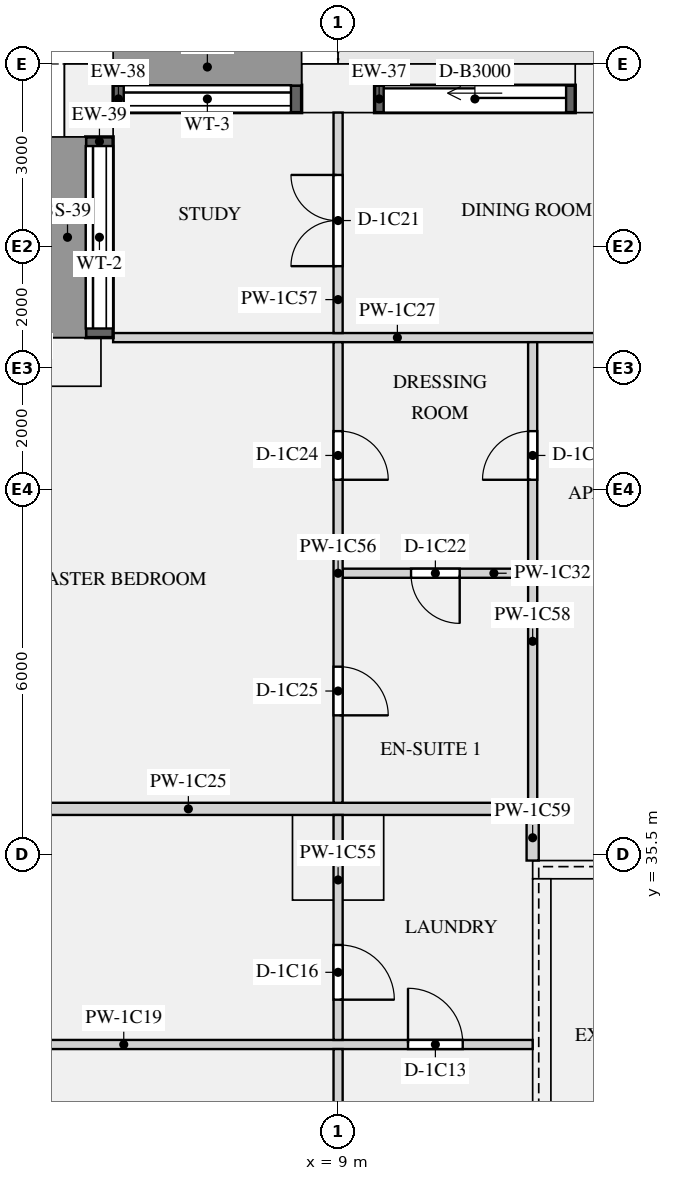
"""IFC4 building model, lengths in metres.
Left out: names, types, materials, properties, quantities, classifications, styles, units other than length and angle.
Written with IfcOpenShell. Run it as: python <this file> out.ifc"""

import sys

from ifc_helpers import new_model, si_unit, direction, frame, frame_2d, origin, origin_2d, place, context, subcontext, project, spatial, rectangle, extrude, element, fill, save


model = new_model("IFC4")
c1 = context("Model", 3, precision=1e-05, world=origin(), true_north=direction((0.0, 1.0)))
c2 = subcontext(c1, "Body", "Model", "MODEL_VIEW")
j1 = project(units=[si_unit("LENGTHUNIT", "METRE"), si_unit("PLANEANGLEUNIT", "RADIAN")], contexts=[c1])
p1 = place(None, origin())
s1 = spatial("IfcSite", under=j1, at=p1, CompositionType="ELEMENT")
p2 = place(p1, origin())
s2 = spatial("IfcBuilding", under=s1, at=p2, CompositionType="ELEMENT")
p3 = place(p2, frame((0.0, 0.0, 38.4)))
s3 = spatial("IfcBuildingStorey", under=s2, at=p3, CompositionType="ELEMENT", Elevation=38.4)
for number, where, z_axis, x_axis in (
    (1, (13.5, 48.1, 0.0), (0.0, 0.0, 1.0), (-1.0, 0.0, 0.0)),
    (2, (9.0, 48.1, 0.0), (0.0, 0.0, 1.0), (-1.0, 0.0, 0.0)),
    (3, (4.9, 47.9, 0.0), (0.0, 0.0, 1.0), (0.0, -1.0, 0.0)),
    (4, (4.5, 43.6, 0.0), (0.0, 0.0, 1.0), (-1.0, 0.0, 0.0)),
):
    element("IfcColumn", number, at=place(p3, frame(where, z_axis=z_axis, x_axis=x_axis)), inside=s3, PredefinedType="USERDEFINED", context=c2, shape_type="SweptSolid", body=[
        extrude(rectangle(XDim=1.2, YDim=0.8, at=origin_2d()), origin(), (0.0, 0.0, 1.0), 3.15),
    ])
p4 = place(p3, frame((9.0, 35.5, 0.0), z_axis=(0.0, 0.0, 1.0), x_axis=(1.0, 0.0, 0.0)))
e5 = element("IfcColumn", 5, at=p4, inside=s3, PredefinedType="COLUMN", context=c2, shape_type="SweptSolid", body=[
    extrude(rectangle(XDim=1.5, YDim=1.5, at=origin_2d()), origin(), (0.0, 0.0, 1.0), 3.15),
])
p5 = place(p3, frame((12.2, 35.25, 0.0), z_axis=(0.0, 0.0, 1.0), x_axis=(1.0, 0.0, 0.0)))
e6 = element("IfcWall", 6, at=p5, inside=s3, PredefinedType="SHEAR", context=c2, shape_type="SweptSolid", body=[
    extrude(rectangle(XDim=3.6, YDim=0.3, at=frame_2d((1.8, 0.0))), origin(), (0.0, 0.0, 1.0), 3.15),
])
p6 = place(p3, frame((12.35, 27.3, 0.0), z_axis=(0.0, 0.0, 1.0), x_axis=(0.0, 1.0, 0.0)))
e7 = element("IfcWall", 7, at=p6, inside=s3, PredefinedType="SHEAR", context=c2, shape_type="SweptSolid", body=[
    extrude(rectangle(XDim=7.8, YDim=0.3, at=frame_2d((3.9, 0.0))), origin(), (0.0, 0.0, 1.0), 3.15),
])
p7 = place(p3, frame((12.9, 47.925, 0.0), z_axis=(0.0, 0.0, 1.0), x_axis=(-1.0, 0.0, 0.0)))
e8 = element("IfcWall", 8, at=p7, inside=s3, PredefinedType="SOLIDWALL", context=c2, shape_type="SweptSolid", body=[
    extrude(rectangle(XDim=3.3, YDim=0.45, at=frame_2d((1.65, 0.0))), origin(), (0.0, 0.0, 1.0), 2.83),
])
p8 = place(p7, frame((0.15, 0.0, 0.0)))
e9 = element("IfcOpeningElement", 9, at=p8, cuts=e8, PredefinedType="OPENING", context=c2, shape_type="SweptSolid", body=[
    extrude(rectangle(XDim=3.0, YDim=2.3, at=frame_2d((1.5, 1.15))), frame((0.0, 0.235, 0.0), z_axis=(0.0, -1.0, 0.0), x_axis=(1.0, 0.0, 0.0)), (0.0, 0.0, 1.0), 0.47),
])
p9 = place(p3, frame((8.4, 47.925, 0.9), z_axis=(0.0, 0.0, 1.0), x_axis=(-1.0, 0.0, 0.0)))
e10 = element("IfcWall", 10, at=p9, inside=s3, PredefinedType="SOLIDWALL", context=c2, shape_type="SweptSolid", body=[
    extrude(rectangle(XDim=3.1, YDim=0.45, at=frame_2d((1.55, 0.0))), origin(), (0.0, 0.0, 1.0), 1.93),
])
p10 = place(p9, frame((0.175, 0.0, 0.15)))
e11 = element("IfcOpeningElement", 11, at=p10, cuts=e10, PredefinedType="OPENING", context=c2, shape_type="SweptSolid", body=[
    extrude(rectangle(XDim=2.75, YDim=1.5, at=frame_2d((1.375, 0.75))), frame((0.0, 0.235, 0.0), z_axis=(0.0, -1.0, 0.0), x_axis=(1.0, 0.0, 0.0)), (0.0, 0.0, 1.0), 0.47),
])
p11 = place(p3, frame((5.075, 47.3, 0.9), z_axis=(0.0, 0.0, 1.0), x_axis=(0.0, -1.0, 0.0)))
e12 = element("IfcWall", 12, at=p11, inside=s3, PredefinedType="SOLIDWALL", context=c2, shape_type="SweptSolid", body=[
    extrude(rectangle(XDim=3.3, YDim=0.45, at=frame_2d((1.65, 0.0))), origin(), (0.0, 0.0, 1.0), 1.93),
])
p12 = place(p11, frame((0.15, 0.0, 0.15)))
e13 = element("IfcOpeningElement", 13, at=p12, cuts=e12, PredefinedType="OPENING", context=c2, shape_type="SweptSolid", body=[
    extrude(rectangle(XDim=3.0, YDim=1.5, at=frame_2d((1.5, 0.75))), frame((0.0, 0.235, 0.0), z_axis=(0.0, -1.0, 0.0), x_axis=(1.0, 0.0, 0.0)), (0.0, 0.0, 1.0), 0.47),
])
p13 = place(p3, frame((0.8, 32.375, 0.0), z_axis=(0.0, 0.0, 1.0), x_axis=(1.0, 0.0, 0.0)))
e14 = element("IfcWall", 14, at=p13, inside=s3, PredefinedType="PARTITIONING", context=c2, shape_type="SweptSolid", body=[
    extrude(rectangle(XDim=11.4, YDim=0.15, at=frame_2d((5.7, 0.0))), origin(), (0.0, 0.0, 1.0), 2.83),
])
p14 = place(p13, frame((9.35, 0.0, 0.0)))
e15 = element("IfcOpeningElement", 15, at=p14, cuts=e14, PredefinedType="OPENING", context=c2, shape_type="SweptSolid", body=[
    extrude(rectangle(XDim=0.9, YDim=2.1, at=frame_2d((0.45, 1.05))), frame((0.0, 0.085, 0.0), z_axis=(0.0, -1.0, 0.0), x_axis=(1.0, 0.0, 0.0)), (0.0, 0.0, 1.0), 0.17),
])
p15 = place(p3, frame((0.8, 36.25, 0.0), z_axis=(0.0, 0.0, 1.0), x_axis=(1.0, 0.0, 0.0)))
e16 = element("IfcWall", 16, at=p15, inside=s3, PredefinedType="PARTITIONING", context=c2, shape_type="SweptSolid", body=[
    extrude(rectangle(XDim=11.475, YDim=0.2, at=frame_2d((5.737, 0.0))), origin(), (0.0, 0.0, 1.0), 2.83),
])
p16 = place(p3, frame((5.3, 44.0, 0.0), z_axis=(0.0, 0.0, 1.0), x_axis=(1.0, 0.0, 0.0)))
e17 = element("IfcWall", 17, at=p16, inside=s3, PredefinedType="PARTITIONING", context=c2, shape_type="SweptSolid", body=[
    extrude(rectangle(XDim=27.775, YDim=0.15, at=frame_2d((13.887, 0.0))), origin(), (0.0, 0.0, 1.0), 2.83),
])
p17 = place(p16, frame((14.5, 0.0, 0.0)))
e18 = element("IfcOpeningElement", 18, at=p17, cuts=e17, PredefinedType="OPENING", context=c2, shape_type="SweptSolid", body=[
    extrude(rectangle(XDim=0.9, YDim=2.1, at=frame_2d((0.45, 1.05))), frame((0.0, 0.085, 0.0), z_axis=(0.0, -1.0, 0.0), x_axis=(1.0, 0.0, 0.0)), (0.0, 0.0, 1.0), 0.17),
])
p18 = place(p16, frame((19.0, 0.0, 0.0)))
e19 = element("IfcOpeningElement", 19, at=p18, cuts=e17, PredefinedType="OPENING", context=c2, shape_type="SweptSolid", body=[
    extrude(rectangle(XDim=0.9, YDim=2.1, at=frame_2d((0.45, 1.05))), frame((0.0, 0.085, 0.0), z_axis=(0.0, -1.0, 0.0), x_axis=(1.0, 0.0, 0.0)), (0.0, 0.0, 1.0), 0.17),
])
p19 = place(p16, frame((9.35, 0.0, 0.0)))
e20 = element("IfcOpeningElement", 20, at=p19, cuts=e17, PredefinedType="OPENING", context=c2, shape_type="SweptSolid", body=[
    extrude(rectangle(XDim=0.9, YDim=2.1, at=frame_2d((0.45, 1.05))), frame((0.0, 0.085, 0.0), z_axis=(0.0, -1.0, 0.0), x_axis=(1.0, 0.0, 0.0)), (0.0, 0.0, 1.0), 0.17),
])
p20 = place(p16, frame((23.5, 0.0, 0.0)))
e21 = element("IfcOpeningElement", 21, at=p20, cuts=e17, PredefinedType="OPENING", context=c2, shape_type="SweptSolid", body=[
    extrude(rectangle(XDim=0.9, YDim=2.1, at=frame_2d((0.45, 1.05))), frame((0.0, 0.085, 0.0), z_axis=(0.0, -1.0, 0.0), x_axis=(1.0, 0.0, 0.0)), (0.0, 0.0, 1.0), 0.17),
])
p21 = place(p3, frame((9.075, 40.125, 0.0), z_axis=(0.0, 0.0, 1.0), x_axis=(1.0, 0.0, 0.0)))
e22 = element("IfcWall", 22, at=p21, inside=s3, PredefinedType="PARTITIONING", context=c2, shape_type="SweptSolid", body=[
    extrude(rectangle(XDim=3.05, YDim=0.15, at=frame_2d((1.525, 0.0))), origin(), (0.0, 0.0, 1.0), 2.83),
])
p22 = place(p21, frame((1.125, 0.0, 0.0)))
e23 = element("IfcOpeningElement", 23, at=p22, cuts=e22, PredefinedType="OPENING", context=c2, shape_type="SweptSolid", body=[
    extrude(rectangle(XDim=0.8, YDim=2.1, at=frame_2d((0.4, 1.05))), frame((0.0, 0.085, 0.0), z_axis=(0.0, -1.0, 0.0), x_axis=(1.0, 0.0, 0.0)), (0.0, 0.0, 1.0), 0.17),
])
p23 = place(p3, frame((9.0, 20.575, 0.0), z_axis=(0.0, 0.0, 1.0), x_axis=(0.0, 1.0, 0.0)))
e24 = element("IfcWall", 24, at=p23, inside=s3, PredefinedType="PARTITIONING", context=c2, shape_type="SweptSolid", body=[
    extrude(rectangle(XDim=11.725, YDim=0.15, at=frame_2d((5.863, 0.0))), origin(), (0.0, 0.0, 1.0), 2.83),
])
p24 = place(p23, frame((5.6, 0.0, 0.0)))
e25 = element("IfcOpeningElement", 25, at=p24, cuts=e24, PredefinedType="OPENING", context=c2, shape_type="SweptSolid", body=[
    extrude(rectangle(XDim=0.9, YDim=2.1, at=frame_2d((0.45, 1.05))), frame((0.0, 0.085, 0.0), z_axis=(0.0, -1.0, 0.0), x_axis=(1.0, 0.0, 0.0)), (0.0, 0.0, 1.0), 0.17),
])
p25 = place(p23, frame((9.413, 0.0, 0.0)))
e26 = element("IfcOpeningElement", 26, at=p25, cuts=e24, PredefinedType="OPENING", context=c2, shape_type="SweptSolid", body=[
    extrude(rectangle(XDim=0.9, YDim=2.1, at=frame_2d((0.45, 1.05))), frame((0.0, 0.085, 0.0), z_axis=(0.0, -1.0, 0.0), x_axis=(1.0, 0.0, 0.0)), (0.0, 0.0, 1.0), 0.17),
])
p26 = place(p3, frame((9.0, 32.45, 0.0), z_axis=(0.0, 0.0, 1.0), x_axis=(0.0, 1.0, 0.0)))
e27 = element("IfcWall", 27, at=p26, inside=s3, PredefinedType="PARTITIONING", context=c2, shape_type="SweptSolid", body=[
    extrude(rectangle(XDim=3.7, YDim=0.15, at=frame_2d((1.85, 0.0))), origin(), (0.0, 0.0, 1.0), 2.83),
])
p27 = place(p26, frame((0.662, 0.0, 0.0)))
e28 = element("IfcOpeningElement", 28, at=p27, cuts=e27, PredefinedType="OPENING", context=c2, shape_type="SweptSolid", body=[
    extrude(rectangle(XDim=0.9, YDim=2.1, at=frame_2d((0.45, 1.05))), frame((0.0, 0.085, 0.0), z_axis=(0.0, -1.0, 0.0), x_axis=(1.0, 0.0, 0.0)), (0.0, 0.0, 1.0), 0.17),
])
p28 = place(p3, frame((9.0, 36.35, 0.0), z_axis=(0.0, 0.0, 1.0), x_axis=(0.0, 1.0, 0.0)))
e29 = element("IfcWall", 29, at=p28, inside=s3, PredefinedType="PARTITIONING", context=c2, shape_type="SweptSolid", body=[
    extrude(rectangle(XDim=7.575, YDim=0.15, at=frame_2d((3.788, 0.0))), origin(), (0.0, 0.0, 1.0), 2.83),
])
p29 = place(p28, frame((5.312, 0.0, 0.0)))
e30 = element("IfcOpeningElement", 30, at=p29, cuts=e29, PredefinedType="OPENING", context=c2, shape_type="SweptSolid", body=[
    extrude(rectangle(XDim=0.8, YDim=2.1, at=frame_2d((0.4, 1.05))), frame((0.0, 0.085, 0.0), z_axis=(0.0, -1.0, 0.0), x_axis=(1.0, 0.0, 0.0)), (0.0, 0.0, 1.0), 0.17),
])
p30 = place(p28, frame((1.438, 0.0, 0.0)))
e31 = element("IfcOpeningElement", 31, at=p30, cuts=e29, PredefinedType="OPENING", context=c2, shape_type="SweptSolid", body=[
    extrude(rectangle(XDim=0.8, YDim=2.1, at=frame_2d((0.4, 1.05))), frame((0.0, 0.085, 0.0), z_axis=(0.0, -1.0, 0.0), x_axis=(1.0, 0.0, 0.0)), (0.0, 0.0, 1.0), 0.17),
])
p31 = place(p3, frame((9.0, 44.075, 0.0), z_axis=(0.0, 0.0, 1.0), x_axis=(0.0, 1.0, 0.0)))
e32 = element("IfcWall", 32, at=p31, inside=s3, PredefinedType="PARTITIONING", context=c2, shape_type="SweptSolid", body=[
    extrude(rectangle(XDim=3.625, YDim=0.15, at=frame_2d((1.812, 0.0))), origin(), (0.0, 0.0, 1.0), 2.83),
])
p32 = place(p31, frame((1.1, 0.0, 0.0)))
e33 = element("IfcOpeningElement", 33, at=p32, cuts=e32, PredefinedType="OPENING", context=c2, shape_type="SweptSolid", body=[
    extrude(rectangle(XDim=1.5, YDim=2.1, at=frame_2d((0.75, 1.05))), frame((0.0, 0.085, 0.0), z_axis=(0.0, -1.0, 0.0), x_axis=(1.0, 0.0, 0.0)), (0.0, 0.0, 1.0), 0.17),
])
p33 = place(p3, frame((12.2, 36.35, 0.0), z_axis=(0.0, 0.0, 1.0), x_axis=(0.0, 1.0, 0.0)))
e34 = element("IfcWall", 34, at=p33, inside=s3, PredefinedType="PARTITIONING", context=c2, shape_type="SweptSolid", body=[
    extrude(rectangle(XDim=7.575, YDim=0.15, at=frame_2d((3.788, 0.0))), origin(), (0.0, 0.0, 1.0), 2.83),
])
p34 = place(p33, frame((5.312, 0.0, 0.0)))
e35 = element("IfcOpeningElement", 35, at=p34, cuts=e34, PredefinedType="OPENING", context=c2, shape_type="SweptSolid", body=[
    extrude(rectangle(XDim=0.8, YDim=2.1, at=frame_2d((0.4, 1.05))), frame((0.0, 0.085, 0.0), z_axis=(0.0, -1.0, 0.0), x_axis=(1.0, 0.0, 0.0)), (0.0, 0.0, 1.0), 0.17),
])
p35 = place(p3, frame((12.2, 35.4, 0.0), z_axis=(0.0, 0.0, 1.0), x_axis=(0.0, 1.0, 0.0)))
e36 = element("IfcWall", 36, at=p35, inside=s3, PredefinedType="PARTITIONING", context=c2, shape_type="SweptSolid", body=[
    extrude(rectangle(XDim=0.75, YDim=0.2, at=frame_2d((0.375, 0.0))), origin(), (0.0, 0.0, 1.0), 2.83),
])
p36 = place(p8, origin())
e37 = element("IfcDoor", 37, at=p36, inside=s3, OperationType="SLIDING_TO_LEFT", PredefinedType="DOOR", context=c2, shape_type="SweptSolid", body=[
    extrude(rectangle(XDim=3.0, YDim=2.3, at=frame_2d((1.5, 1.15))), frame((0.0, -0.07, 0.0), z_axis=(0.0, -1.0, 0.0), x_axis=(1.0, 0.0, 0.0)), (0.0, 0.0, 1.0), 0.05),
])
fill(e9, e37)
p37 = place(p10, origin())
e38 = element("IfcWindow", 38, at=p37, inside=s3, PartitioningType="SINGLE_PANEL", PredefinedType="WINDOW", context=c2, shape_type="SweptSolid", body=[
    extrude(rectangle(XDim=2.75, YDim=1.5, at=frame_2d((1.375, 0.75))), frame((0.0, -0.065, 0.0), z_axis=(0.0, -1.0, 0.0), x_axis=(1.0, 0.0, 0.0)), (0.0, 0.0, 1.0), 0.06),
])
fill(e11, e38)
p38 = place(p12, origin())
e39 = element("IfcWindow", 39, at=p38, inside=s3, PartitioningType="SINGLE_PANEL", PredefinedType="WINDOW", context=c2, shape_type="SweptSolid", body=[
    extrude(rectangle(XDim=3.0, YDim=1.5, at=frame_2d((1.5, 0.75))), frame((0.0, -0.065, 0.0), z_axis=(0.0, -1.0, 0.0), x_axis=(1.0, 0.0, 0.0)), (0.0, 0.0, 1.0), 0.06),
])
fill(e13, e39)
p39 = place(p14, origin())
e40 = element("IfcDoor", 40, at=p39, inside=s3, OperationType="SINGLE_SWING_LEFT", PredefinedType="DOOR", context=c2, shape_type="SweptSolid", body=[
    extrude(rectangle(XDim=0.9, YDim=2.1, at=frame_2d((0.45, 1.05))), frame((0.0, 0.025, 0.0), z_axis=(0.0, -1.0, 0.0), x_axis=(1.0, 0.0, 0.0)), (0.0, 0.0, 1.0), 0.05),
])
fill(e15, e40)
p40 = place(p27, frame((0.9, 0.0, 0.0), z_axis=(0.0, 0.0, 1.0), x_axis=(-1.0, 0.0, 0.0)))
e41 = element("IfcDoor", 41, at=p40, inside=s3, OperationType="SINGLE_SWING_RIGHT", PredefinedType="DOOR", context=c2, shape_type="SweptSolid", body=[
    extrude(rectangle(XDim=0.9, YDim=2.1, at=frame_2d((0.45, 1.05))), frame((0.0, 0.025, 0.0), z_axis=(0.0, -1.0, 0.0), x_axis=(1.0, 0.0, 0.0)), (0.0, 0.0, 1.0), 0.05),
])
fill(e28, e41)
p41 = place(p32, origin())
e42 = element("IfcDoor", 42, at=p41, inside=s3, OperationType="DOUBLE_DOOR_SINGLE_SWING", PredefinedType="DOOR", context=c2, shape_type="SweptSolid", body=[
    extrude(rectangle(XDim=1.5, YDim=2.1, at=frame_2d((0.75, 1.05))), frame((0.0, 0.025, 0.0), z_axis=(0.0, -1.0, 0.0), x_axis=(1.0, 0.0, 0.0)), (0.0, 0.0, 1.0), 0.05),
])
fill(e33, e42)
p42 = place(p22, frame((0.8, 0.0, 0.0), z_axis=(0.0, 0.0, 1.0), x_axis=(-1.0, 0.0, 0.0)))
e43 = element("IfcDoor", 43, at=p42, inside=s3, OperationType="SINGLE_SWING_LEFT", PredefinedType="DOOR", context=c2, shape_type="SweptSolid", body=[
    extrude(rectangle(XDim=0.8, YDim=2.1, at=frame_2d((0.4, 1.05))), frame((0.0, 0.025, 0.0), z_axis=(0.0, -1.0, 0.0), x_axis=(1.0, 0.0, 0.0)), (0.0, 0.0, 1.0), 0.05),
])
fill(e23, e43)
p43 = place(p34, origin())
e44 = element("IfcDoor", 44, at=p43, inside=s3, OperationType="SINGLE_SWING_LEFT", PredefinedType="DOOR", context=c2, shape_type="SweptSolid", body=[
    extrude(rectangle(XDim=0.8, YDim=2.1, at=frame_2d((0.4, 1.05))), frame((0.0, 0.025, 0.0), z_axis=(0.0, -1.0, 0.0), x_axis=(1.0, 0.0, 0.0)), (0.0, 0.0, 1.0), 0.05),
])
fill(e35, e44)
p44 = place(p29, frame((0.8, 0.0, 0.0), z_axis=(0.0, 0.0, 1.0), x_axis=(-1.0, 0.0, 0.0)))
e45 = element("IfcDoor", 45, at=p44, inside=s3, OperationType="SINGLE_SWING_RIGHT", PredefinedType="DOOR", context=c2, shape_type="SweptSolid", body=[
    extrude(rectangle(XDim=0.8, YDim=2.1, at=frame_2d((0.4, 1.05))), frame((0.0, 0.025, 0.0), z_axis=(0.0, -1.0, 0.0), x_axis=(1.0, 0.0, 0.0)), (0.0, 0.0, 1.0), 0.05),
])
fill(e30, e45)
p45 = place(p30, frame((0.8, 0.0, 0.0), z_axis=(0.0, 0.0, 1.0), x_axis=(-1.0, 0.0, 0.0)))
e46 = element("IfcDoor", 46, at=p45, inside=s3, OperationType="SINGLE_SWING_RIGHT", PredefinedType="DOOR", context=c2, shape_type="SweptSolid", body=[
    extrude(rectangle(XDim=0.8, YDim=2.1, at=frame_2d((0.4, 1.05))), frame((0.0, 0.025, 0.0), z_axis=(0.0, -1.0, 0.0), x_axis=(1.0, 0.0, 0.0)), (0.0, 0.0, 1.0), 0.05),
])
fill(e31, e46)
save(model, sys.argv[1])
